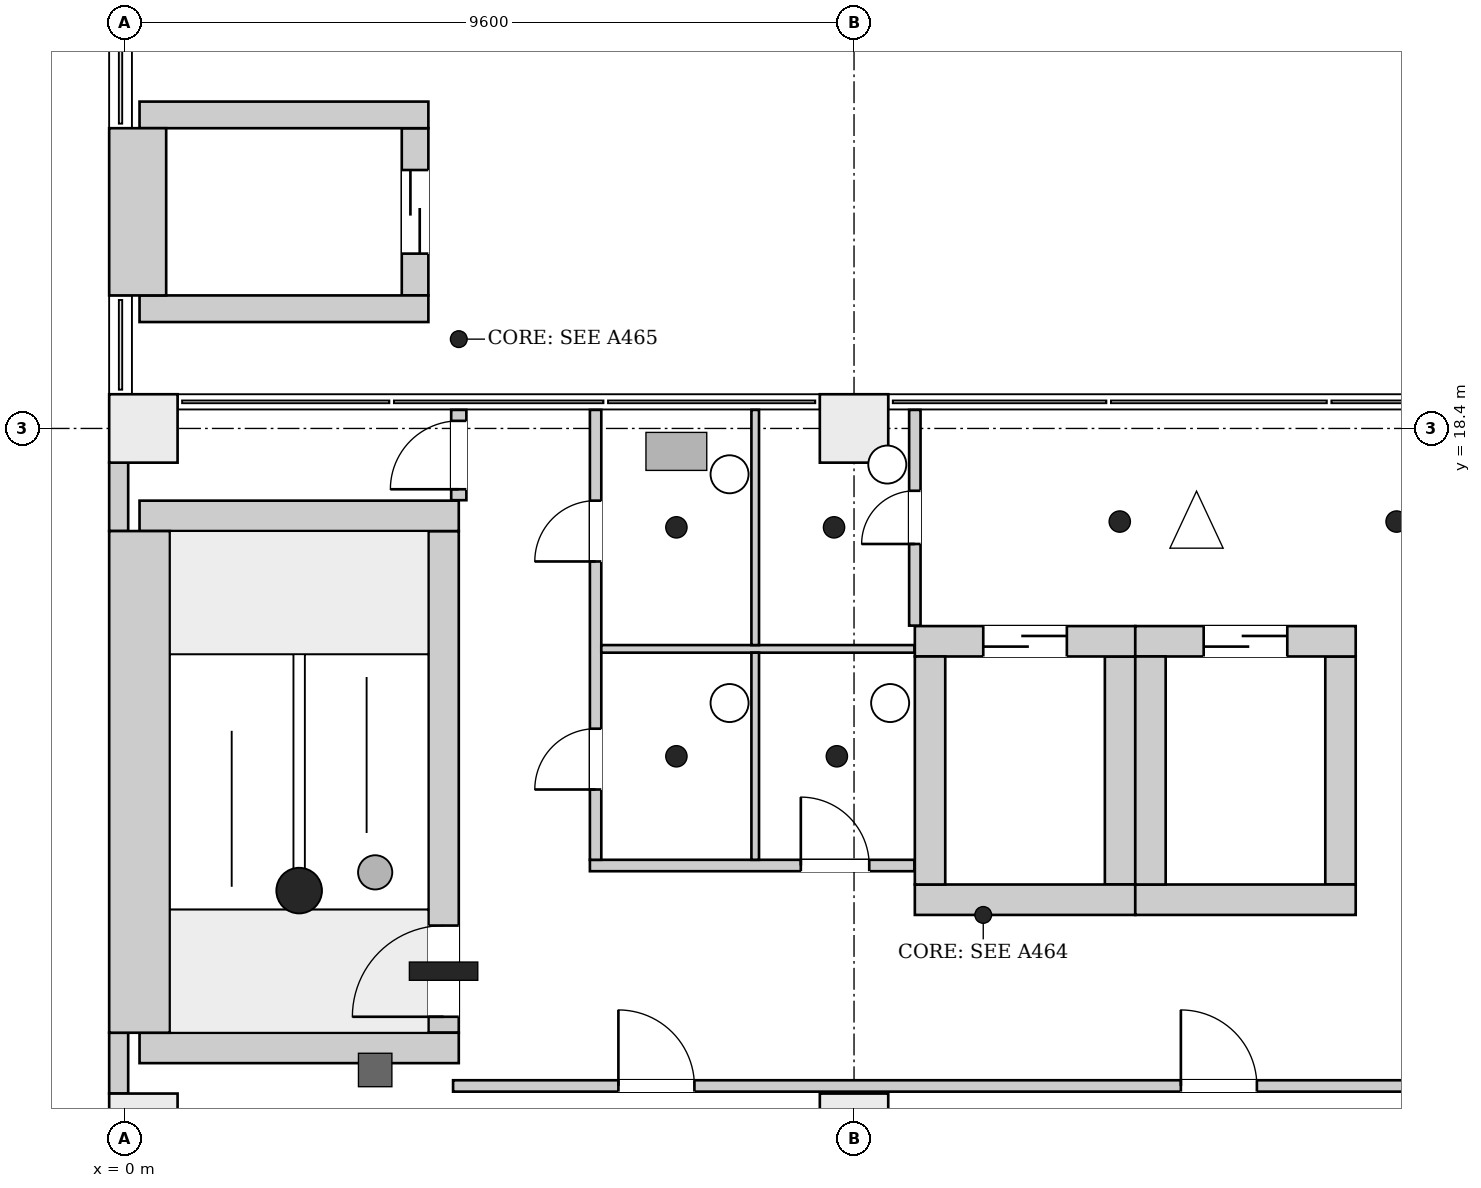
"""IFC4 building model, lengths in metres.
Left out: names, types, materials, properties, quantities, classifications, styles, units other than length and angle.
Written with IfcOpenShell. Run it as: python <this file> out.ifc"""

import sys

from ifc_helpers import new_model, si_unit, direction, frame, frame_2d, origin, origin_2d, place, context, subcontext, project, spatial, rectangle, extrude, element, fill, save


model = new_model("IFC4")
c1 = context("Model", 3, precision=1e-05, world=origin(), true_north=direction((0.0, 1.0)))
c2 = subcontext(c1, "Body", "Model", "MODEL_VIEW")
j1 = project(units=[si_unit("LENGTHUNIT", "METRE"), si_unit("PLANEANGLEUNIT", "RADIAN")], contexts=[c1])
p1 = place(None, origin())
s1 = spatial("IfcSite", under=j1, at=p1, CompositionType="ELEMENT")
p2 = place(p1, origin())
s2 = spatial("IfcBuilding", under=s1, at=p2, CompositionType="ELEMENT")
p3 = place(p2, frame((0.0, 0.0, 31.9)))
s3 = spatial("IfcBuildingStorey", under=s2, at=p3, CompositionType="ELEMENT", Elevation=31.9)
for number, where, z_axis, x_axis in (
    (1, (0.2, 10.25, 0.0), (0.0, 0.0, 1.0), (1.0, 0.0, 0.0)),
    (2, (0.2, 17.25, 0.0), (0.0, 0.0, 1.0), (1.0, 0.0, 0.0)),
):
    element("IfcWall", number, at=place(p3, frame(where, z_axis=z_axis, x_axis=x_axis)), inside=s3, PredefinedType="SHEAR", context=c2, shape_type="SweptSolid", body=[
        extrude(rectangle(XDim=4.2, YDim=0.4, at=frame_2d((2.1, 0.0))), origin(), (0.0, 0.0, 1.0), 4.2),
    ])
p4 = place(p3, frame((0.2, 10.45, 0.0), z_axis=(0.0, 0.0, 1.0), x_axis=(0.0, 1.0, 0.0)))
e3 = element("IfcWall", 3, at=p4, inside=s3, PredefinedType="SHEAR", context=c2, shape_type="SweptSolid", body=[
    extrude(rectangle(XDim=6.6, YDim=0.8, at=frame_2d((3.3, 0.0))), origin(), (0.0, 0.0, 1.0), 4.2),
])
p5 = place(p3, frame((4.2, 10.45, 0.0), z_axis=(0.0, 0.0, 1.0), x_axis=(0.0, 1.0, 0.0)))
e4 = element("IfcWall", 4, at=p5, inside=s3, PredefinedType="SHEAR", context=c2, shape_type="SweptSolid", body=[
    extrude(rectangle(XDim=6.6, YDim=0.4, at=frame_2d((3.3, 0.0))), origin(), (0.0, 0.0, 1.0), 4.2),
])
p6 = place(p5, frame((0.21, 0.0, 0.0)))
e5 = element("IfcOpeningElement", 5, at=p6, cuts=e4, PredefinedType="OPENING", context=c2, shape_type="SweptSolid", body=[
    extrude(rectangle(XDim=1.2, YDim=2.1, at=frame_2d((0.6, 1.05))), frame((0.0, 0.21, 0.0), z_axis=(0.0, -1.0, 0.0), x_axis=(1.0, 0.0, 0.0)), (0.0, 0.0, 1.0), 0.42),
])
for number, where, z_axis, x_axis in (
    (6, (0.2, 19.975, 0.0), (0.0, 0.0, 1.0), (1.0, 0.0, 0.0)),
    (7, (0.2, 22.525, 0.0), (0.0, 0.0, 1.0), (1.0, 0.0, 0.0)),
):
    element("IfcWall", number, at=place(p3, frame(where, z_axis=z_axis, x_axis=x_axis)), inside=s3, PredefinedType="SHEAR", context=c2, shape_type="SweptSolid", body=[
        extrude(rectangle(XDim=3.8, YDim=0.35, at=frame_2d((1.9, 0.0))), origin(), (0.0, 0.0, 1.0), 4.2),
    ])
p7 = place(p3, frame((0.176, 20.15, 0.0), z_axis=(0.0, 0.0, 1.0), x_axis=(0.0, 1.0, 0.0)))
e8 = element("IfcWall", 8, at=p7, inside=s3, PredefinedType="SHEAR", context=c2, shape_type="SweptSolid", body=[
    extrude(rectangle(XDim=2.2, YDim=0.75, at=frame_2d((1.1, 0.0))), origin(), (0.0, 0.0, 1.0), 4.2),
])
p8 = place(p3, frame((3.825, 20.15, 0.0), z_axis=(0.0, 0.0, 1.0), x_axis=(0.0, 1.0, 0.0)))
e9 = element("IfcWall", 9, at=p8, inside=s3, PredefinedType="SHEAR", context=c2, shape_type="SweptSolid", body=[
    extrude(rectangle(XDim=2.2, YDim=0.35, at=frame_2d((1.1, 0.0))), origin(), (0.0, 0.0, 1.0), 4.2),
])
p9 = place(p8, frame((0.55, 0.0, 0.0)))
e10 = element("IfcOpeningElement", 10, at=p9, cuts=e9, PredefinedType="OPENING", context=c2, shape_type="SweptSolid", body=[
    extrude(rectangle(XDim=1.1, YDim=2.1, at=frame_2d((0.55, 1.05))), frame((0.0, 0.185, 0.0), z_axis=(0.0, -1.0, 0.0), x_axis=(1.0, 0.0, 0.0)), (0.0, 0.0, 1.0), 0.37),
])
p10 = place(p3, frame((10.4, 12.2, 0.0), z_axis=(0.0, 0.0, 1.0), x_axis=(1.0, 0.0, 0.0)))
e11 = element("IfcWall", 11, at=p10, inside=s3, PredefinedType="SHEAR", context=c2, shape_type="SweptSolid", body=[
    extrude(rectangle(XDim=2.9, YDim=0.4, at=frame_2d((1.45, 0.0))), origin(), (0.0, 0.0, 1.0), 4.2),
])
p11 = place(p3, frame((10.4, 15.6, 0.0), z_axis=(0.0, 0.0, 1.0), x_axis=(1.0, 0.0, 0.0)))
e12 = element("IfcWall", 12, at=p11, inside=s3, PredefinedType="SHEAR", context=c2, shape_type="SweptSolid", body=[
    extrude(rectangle(XDim=2.9, YDim=0.4, at=frame_2d((1.45, 0.0))), origin(), (0.0, 0.0, 1.0), 4.2),
])
p12 = place(p11, frame((0.9, 0.0, 0.0)))
e13 = element("IfcOpeningElement", 13, at=p12, cuts=e12, PredefinedType="OPENING", context=c2, shape_type="SweptSolid", body=[
    extrude(rectangle(XDim=1.1, YDim=2.1, at=frame_2d((0.55, 1.05))), frame((0.0, 0.21, 0.0), z_axis=(0.0, -1.0, 0.0), x_axis=(1.0, 0.0, 0.0)), (0.0, 0.0, 1.0), 0.42),
])
for number, where, z_axis, x_axis in (
    (14, (10.6, 12.4, 0.0), (0.0, 0.0, 1.0), (0.0, 1.0, 0.0)),
    (15, (13.1, 12.4, 0.0), (0.0, 0.0, 1.0), (0.0, 1.0, 0.0)),
):
    element("IfcWall", number, at=place(p3, frame(where, z_axis=z_axis, x_axis=x_axis)), inside=s3, PredefinedType="SHEAR", context=c2, shape_type="SweptSolid", body=[
        extrude(rectangle(XDim=3.0, YDim=0.4, at=frame_2d((1.5, 0.0))), origin(), (0.0, 0.0, 1.0), 4.2),
    ])
p13 = place(p3, frame((13.3, 12.2, 0.0), z_axis=(0.0, 0.0, 1.0), x_axis=(1.0, 0.0, 0.0)))
e16 = element("IfcWall", 16, at=p13, inside=s3, PredefinedType="SHEAR", context=c2, shape_type="SweptSolid", body=[
    extrude(rectangle(XDim=2.9, YDim=0.4, at=frame_2d((1.45, 0.0))), origin(), (0.0, 0.0, 1.0), 4.2),
])
p14 = place(p3, frame((13.3, 15.6, 0.0), z_axis=(0.0, 0.0, 1.0), x_axis=(1.0, 0.0, 0.0)))
e17 = element("IfcWall", 17, at=p14, inside=s3, PredefinedType="SHEAR", context=c2, shape_type="SweptSolid", body=[
    extrude(rectangle(XDim=2.9, YDim=0.4, at=frame_2d((1.45, 0.0))), origin(), (0.0, 0.0, 1.0), 4.2),
])
p15 = place(p14, frame((0.9, 0.0, 0.0)))
e18 = element("IfcOpeningElement", 18, at=p15, cuts=e17, PredefinedType="OPENING", context=c2, shape_type="SweptSolid", body=[
    extrude(rectangle(XDim=1.1, YDim=2.1, at=frame_2d((0.55, 1.05))), frame((0.0, 0.21, 0.0), z_axis=(0.0, -1.0, 0.0), x_axis=(1.0, 0.0, 0.0)), (0.0, 0.0, 1.0), 0.42),
])
for number, where, z_axis, x_axis in (
    (19, (13.5, 12.4, 0.0), (0.0, 0.0, 1.0), (0.0, 1.0, 0.0)),
    (20, (16.0, 12.4, 0.0), (0.0, 0.0, 1.0), (0.0, 1.0, 0.0)),
):
    element("IfcWall", number, at=place(p3, frame(where, z_axis=z_axis, x_axis=x_axis)), inside=s3, PredefinedType="SHEAR", context=c2, shape_type="SweptSolid", body=[
        extrude(rectangle(XDim=3.0, YDim=0.4, at=frame_2d((1.5, 0.0))), origin(), (0.0, 0.0, 1.0), 4.2),
    ])
for number, where, z_axis, x_axis in (
    (21, (0.25, 9.2, 0.0), (0.0, 0.0, 1.0), (1.0, 0.0, 0.0)),
    (22, (9.6, 9.2, 0.0), (0.0, 0.0, 1.0), (1.0, 0.0, 0.0)),
    (23, (0.25, 18.4, 0.0), (0.0, 0.0, 1.0), (1.0, 0.0, 0.0)),
    (24, (9.6, 18.4, 0.0), (0.0, 0.0, 1.0), (1.0, 0.0, 0.0)),
):
    element("IfcColumn", number, at=place(p3, frame(where, z_axis=z_axis, x_axis=x_axis)), inside=s3, PredefinedType="COLUMN", context=c2, shape_type="SweptSolid", body=[
        extrude(rectangle(XDim=0.9, YDim=0.9, at=origin_2d()), origin(), (0.0, 0.0, 1.0), 4.2),
    ])
p16 = place(p3, frame((-0.074, 10.45, 0.0), z_axis=(0.0, 0.0, 1.0), x_axis=(0.0, -1.0, 0.0)))
e25 = element("IfcWall", 25, at=p16, inside=s3, PredefinedType="ELEMENTEDWALL", context=c2, shape_type="SweptSolid", body=[
    extrude(rectangle(XDim=0.8, YDim=0.25, at=frame_2d((0.4, 0.0))), origin(), (0.0, 0.0, 1.0), 3.9),
])
p17 = place(p3, frame((-0.074, 17.95, 0.0), z_axis=(0.0, 0.0, 1.0), x_axis=(0.0, -1.0, 0.0)))
e26 = element("IfcWall", 26, at=p17, inside=s3, PredefinedType="ELEMENTEDWALL", context=c2, shape_type="SweptSolid", body=[
    extrude(rectangle(XDim=0.9, YDim=0.25, at=frame_2d((0.45, 0.0))), origin(), (0.0, 0.0, 1.0), 3.9),
])
p18 = place(p3, frame((4.4, 17.456, 0.0), z_axis=(0.0, 0.0, 1.0), x_axis=(0.0, 1.0, 0.0)))
e27 = element("IfcWall", 27, at=p18, inside=s3, PredefinedType="PARTITIONING", context=c2, shape_type="SweptSolid", body=[
    extrude(rectangle(XDim=1.188, YDim=0.2, at=frame_2d((0.594, 0.0))), origin(), (0.0, 0.0, 1.0), 3.9),
])
p19 = place(p18, frame((0.144, 0.0, 0.0)))
e28 = element("IfcOpeningElement", 28, at=p19, cuts=e27, PredefinedType="OPENING", context=c2, shape_type="SweptSolid", body=[
    extrude(rectangle(XDim=0.9, YDim=2.1, at=frame_2d((0.45, 1.05))), frame((0.0, 0.11, 0.0), z_axis=(0.0, -1.0, 0.0), x_axis=(1.0, 0.0, 0.0)), (0.0, 0.0, 1.0), 0.22),
])
p20 = place(p3, frame((4.325, 9.75, 0.0), z_axis=(0.0, 0.0, 1.0), x_axis=(1.0, 0.0, 0.0)))
e29 = element("IfcWall", 29, at=p20, inside=s3, PredefinedType="PARTITIONING", context=c2, shape_type="SweptSolid", body=[
    extrude(rectangle(XDim=43.869, YDim=0.15, at=frame_2d((21.935, 0.0))), origin(), (0.0, 0.0, 1.0), 3.9),
])
p21 = place(p20, frame((2.175, 0.0, 0.0)))
e30 = element("IfcOpeningElement", 30, at=p21, cuts=e29, PredefinedType="OPENING", context=c2, shape_type="SweptSolid", body=[
    extrude(rectangle(XDim=1.0, YDim=2.1, at=frame_2d((0.5, 1.05))), frame((0.0, 0.085, 0.0), z_axis=(0.0, -1.0, 0.0), x_axis=(1.0, 0.0, 0.0)), (0.0, 0.0, 1.0), 0.17),
])
p22 = place(p20, frame((9.575, 0.0, 0.0)))
e31 = element("IfcOpeningElement", 31, at=p22, cuts=e29, PredefinedType="OPENING", context=c2, shape_type="SweptSolid", body=[
    extrude(rectangle(XDim=1.0, YDim=2.1, at=frame_2d((0.5, 1.05))), frame((0.0, 0.085, 0.0), z_axis=(0.0, -1.0, 0.0), x_axis=(1.0, 0.0, 0.0)), (0.0, 0.0, 1.0), 0.17),
])
p23 = place(p20, frame((22.825, 0.0, 0.0)))
e32 = element("IfcOpeningElement", 32, at=p23, cuts=e29, PredefinedType="OPENING", context=c2, shape_type="SweptSolid", body=[
    extrude(rectangle(XDim=1.2, YDim=2.1, at=frame_2d((0.6, 1.05))), frame((0.0, 0.085, 0.0), z_axis=(0.0, -1.0, 0.0), x_axis=(1.0, 0.0, 0.0)), (0.0, 0.0, 1.0), 0.17),
])
p24 = place(p20, frame((38.525, 0.0, 0.0)))
e33 = element("IfcOpeningElement", 33, at=p24, cuts=e29, PredefinedType="OPENING", context=c2, shape_type="SweptSolid", body=[
    extrude(rectangle(XDim=0.9, YDim=2.1, at=frame_2d((0.45, 1.05))), frame((0.0, 0.085, 0.0), z_axis=(0.0, -1.0, 0.0), x_axis=(1.0, 0.0, 0.0)), (0.0, 0.0, 1.0), 0.17),
])
p25 = place(p3, frame((6.125, 12.65, 0.0), z_axis=(0.0, 0.0, 1.0), x_axis=(1.0, 0.0, 0.0)))
e34 = element("IfcWall", 34, at=p25, inside=s3, PredefinedType="PARTITIONING", context=c2, shape_type="SweptSolid", body=[
    extrude(rectangle(XDim=4.269, YDim=0.15, at=frame_2d((2.135, 0.0))), origin(), (0.0, 0.0, 1.0), 3.9),
])
p26 = place(p25, frame((2.775, 0.0, 0.0)))
e35 = element("IfcOpeningElement", 35, at=p26, cuts=e34, PredefinedType="OPENING", context=c2, shape_type="SweptSolid", body=[
    extrude(rectangle(XDim=0.9, YDim=2.1, at=frame_2d((0.45, 1.05))), frame((0.0, 0.085, 0.0), z_axis=(0.0, -1.0, 0.0), x_axis=(1.0, 0.0, 0.0)), (0.0, 0.0, 1.0), 0.17),
])
p27 = place(p3, frame((6.2, 12.725, 0.0), z_axis=(0.0, 0.0, 1.0), x_axis=(0.0, 1.0, 0.0)))
e36 = element("IfcWall", 36, at=p27, inside=s3, PredefinedType="PARTITIONING", context=c2, shape_type="SweptSolid", body=[
    extrude(rectangle(XDim=5.919, YDim=0.15, at=frame_2d((2.959, 0.0))), origin(), (0.0, 0.0, 1.0), 3.9),
])
p28 = place(p27, frame((0.925, 0.0, 0.0)))
e37 = element("IfcOpeningElement", 37, at=p28, cuts=e36, PredefinedType="OPENING", context=c2, shape_type="SweptSolid", body=[
    extrude(rectangle(XDim=0.8, YDim=2.1, at=frame_2d((0.4, 1.05))), frame((0.0, 0.085, 0.0), z_axis=(0.0, -1.0, 0.0), x_axis=(1.0, 0.0, 0.0)), (0.0, 0.0, 1.0), 0.17),
])
p29 = place(p27, frame((3.925, 0.0, 0.0)))
e38 = element("IfcOpeningElement", 38, at=p29, cuts=e36, PredefinedType="OPENING", context=c2, shape_type="SweptSolid", body=[
    extrude(rectangle(XDim=0.8, YDim=2.1, at=frame_2d((0.4, 1.05))), frame((0.0, 0.085, 0.0), z_axis=(0.0, -1.0, 0.0), x_axis=(1.0, 0.0, 0.0)), (0.0, 0.0, 1.0), 0.17),
])
p30 = place(p3, frame((6.275, 15.5, 0.0), z_axis=(0.0, 0.0, 1.0), x_axis=(1.0, 0.0, 0.0)))
e39 = element("IfcWall", 39, at=p30, inside=s3, PredefinedType="PARTITIONING", context=c2, shape_type="SweptSolid", body=[
    extrude(rectangle(XDim=4.119, YDim=0.1, at=frame_2d((2.06, 0.0))), origin(), (0.0, 0.0, 1.0), 3.9),
])
p31 = place(p3, frame((8.3, 12.725, 0.0), z_axis=(0.0, 0.0, 1.0), x_axis=(0.0, 1.0, 0.0)))
e40 = element("IfcWall", 40, at=p31, inside=s3, PredefinedType="PARTITIONING", context=c2, shape_type="SweptSolid", body=[
    extrude(rectangle(XDim=2.725, YDim=0.1, at=frame_2d((1.362, 0.0))), origin(), (0.0, 0.0, 1.0), 3.9),
])
p32 = place(p3, frame((8.3, 15.55, 0.0), z_axis=(0.0, 0.0, 1.0), x_axis=(0.0, 1.0, 0.0)))
e41 = element("IfcWall", 41, at=p32, inside=s3, PredefinedType="PARTITIONING", context=c2, shape_type="SweptSolid", body=[
    extrude(rectangle(XDim=3.094, YDim=0.1, at=frame_2d((1.547, 0.0))), origin(), (0.0, 0.0, 1.0), 3.9),
])
p33 = place(p3, frame((10.4, 15.806, 0.0), z_axis=(0.0, 0.0, 1.0), x_axis=(0.0, 1.0, 0.0)))
e42 = element("IfcWall", 42, at=p33, inside=s3, PredefinedType="PARTITIONING", context=c2, shape_type="SweptSolid", body=[
    extrude(rectangle(XDim=2.838, YDim=0.15, at=frame_2d((1.419, 0.0))), origin(), (0.0, 0.0, 1.0), 3.9),
])
p34 = place(p33, frame((1.074, 0.0, 0.0)))
e43 = element("IfcOpeningElement", 43, at=p34, cuts=e42, PredefinedType="OPENING", context=c2, shape_type="SweptSolid", body=[
    extrude(rectangle(XDim=0.7, YDim=2.1, at=frame_2d((0.35, 1.05))), frame((0.0, 0.085, 0.0), z_axis=(0.0, -1.0, 0.0), x_axis=(1.0, 0.0, 0.0)), (0.0, 0.0, 1.0), 0.17),
])
p35 = place(p6, origin())
e44 = element("IfcDoor", 44, at=p35, inside=s3, OperationType="SINGLE_SWING_RIGHT", PredefinedType="DOOR", context=c2, shape_type="SweptSolid", body=[
    extrude(rectangle(XDim=1.2, YDim=2.1, at=frame_2d((0.6, 1.05))), frame((0.0, 0.025, 0.0), z_axis=(0.0, -1.0, 0.0), x_axis=(1.0, 0.0, 0.0)), (0.0, 0.0, 1.0), 0.05),
])
fill(e5, e44)
p36 = place(p9, origin())
e45 = element("IfcDoor", 45, at=p36, inside=s3, OperationType="DOUBLE_DOOR_SLIDING", PredefinedType="DOOR", context=c2, shape_type="SweptSolid", body=[
    extrude(rectangle(XDim=1.1, YDim=2.1, at=frame_2d((0.55, 1.05))), frame((0.0, 0.025, 0.0), z_axis=(0.0, -1.0, 0.0), x_axis=(1.0, 0.0, 0.0)), (0.0, 0.0, 1.0), 0.05),
])
fill(e10, e45)
p37 = place(p12, origin())
e46 = element("IfcDoor", 46, at=p37, inside=s3, OperationType="DOUBLE_DOOR_SLIDING", PredefinedType="DOOR", context=c2, shape_type="SweptSolid", body=[
    extrude(rectangle(XDim=1.1, YDim=2.1, at=frame_2d((0.55, 1.05))), frame((0.0, 0.025, 0.0), z_axis=(0.0, -1.0, 0.0), x_axis=(1.0, 0.0, 0.0)), (0.0, 0.0, 1.0), 0.05),
])
fill(e13, e46)
p38 = place(p15, origin())
e47 = element("IfcDoor", 47, at=p38, inside=s3, OperationType="DOUBLE_DOOR_SLIDING", PredefinedType="DOOR", context=c2, shape_type="SweptSolid", body=[
    extrude(rectangle(XDim=1.1, YDim=2.1, at=frame_2d((0.55, 1.05))), frame((0.0, 0.025, 0.0), z_axis=(0.0, -1.0, 0.0), x_axis=(1.0, 0.0, 0.0)), (0.0, 0.0, 1.0), 0.05),
])
fill(e18, e47)
p39 = place(p19, origin())
e48 = element("IfcDoor", 48, at=p39, inside=s3, OperationType="SINGLE_SWING_LEFT", PredefinedType="DOOR", context=c2, shape_type="SweptSolid", body=[
    extrude(rectangle(XDim=0.9, YDim=2.1, at=frame_2d((0.45, 1.05))), frame((0.0, 0.025, 0.0), z_axis=(0.0, -1.0, 0.0), x_axis=(1.0, 0.0, 0.0)), (0.0, 0.0, 1.0), 0.05),
])
fill(e28, e48)
p40 = place(p28, origin())
e49 = element("IfcDoor", 49, at=p40, inside=s3, OperationType="SINGLE_SWING_LEFT", PredefinedType="DOOR", context=c2, shape_type="SweptSolid", body=[
    extrude(rectangle(XDim=0.8, YDim=2.1, at=frame_2d((0.4, 1.05))), frame((0.0, 0.025, 0.0), z_axis=(0.0, -1.0, 0.0), x_axis=(1.0, 0.0, 0.0)), (0.0, 0.0, 1.0), 0.05),
])
fill(e37, e49)
p41 = place(p26, origin())
e50 = element("IfcDoor", 50, at=p41, inside=s3, OperationType="SINGLE_SWING_RIGHT", PredefinedType="DOOR", context=c2, shape_type="SweptSolid", body=[
    extrude(rectangle(XDim=0.9, YDim=2.1, at=frame_2d((0.45, 1.05))), frame((0.0, 0.025, 0.0), z_axis=(0.0, -1.0, 0.0), x_axis=(1.0, 0.0, 0.0)), (0.0, 0.0, 1.0), 0.05),
])
fill(e35, e50)
p42 = place(p29, origin())
e51 = element("IfcDoor", 51, at=p42, inside=s3, OperationType="SINGLE_SWING_LEFT", PredefinedType="DOOR", context=c2, shape_type="SweptSolid", body=[
    extrude(rectangle(XDim=0.8, YDim=2.1, at=frame_2d((0.4, 1.05))), frame((0.0, 0.025, 0.0), z_axis=(0.0, -1.0, 0.0), x_axis=(1.0, 0.0, 0.0)), (0.0, 0.0, 1.0), 0.05),
])
fill(e38, e51)
p43 = place(p34, origin())
e52 = element("IfcDoor", 52, at=p43, inside=s3, OperationType="SINGLE_SWING_LEFT", PredefinedType="DOOR", context=c2, shape_type="SweptSolid", body=[
    extrude(rectangle(XDim=0.7, YDim=2.1, at=frame_2d((0.35, 1.05))), frame((0.0, 0.025, 0.0), z_axis=(0.0, -1.0, 0.0), x_axis=(1.0, 0.0, 0.0)), (0.0, 0.0, 1.0), 0.05),
])
fill(e43, e52)
p44 = place(p21, origin())
e53 = element("IfcDoor", 53, at=p44, inside=s3, OperationType="SINGLE_SWING_RIGHT", PredefinedType="DOOR", context=c2, shape_type="SweptSolid", body=[
    extrude(rectangle(XDim=1.0, YDim=2.1, at=frame_2d((0.5, 1.05))), frame((0.0, 0.025, 0.0), z_axis=(0.0, -1.0, 0.0), x_axis=(1.0, 0.0, 0.0)), (0.0, 0.0, 1.0), 0.05),
])
fill(e30, e53)
p45 = place(p22, origin())
e54 = element("IfcDoor", 54, at=p45, inside=s3, OperationType="SINGLE_SWING_RIGHT", PredefinedType="DOOR", context=c2, shape_type="SweptSolid", body=[
    extrude(rectangle(XDim=1.0, YDim=2.1, at=frame_2d((0.5, 1.05))), frame((0.0, 0.025, 0.0), z_axis=(0.0, -1.0, 0.0), x_axis=(1.0, 0.0, 0.0)), (0.0, 0.0, 1.0), 0.05),
])
fill(e31, e54)
save(model, sys.argv[1])
